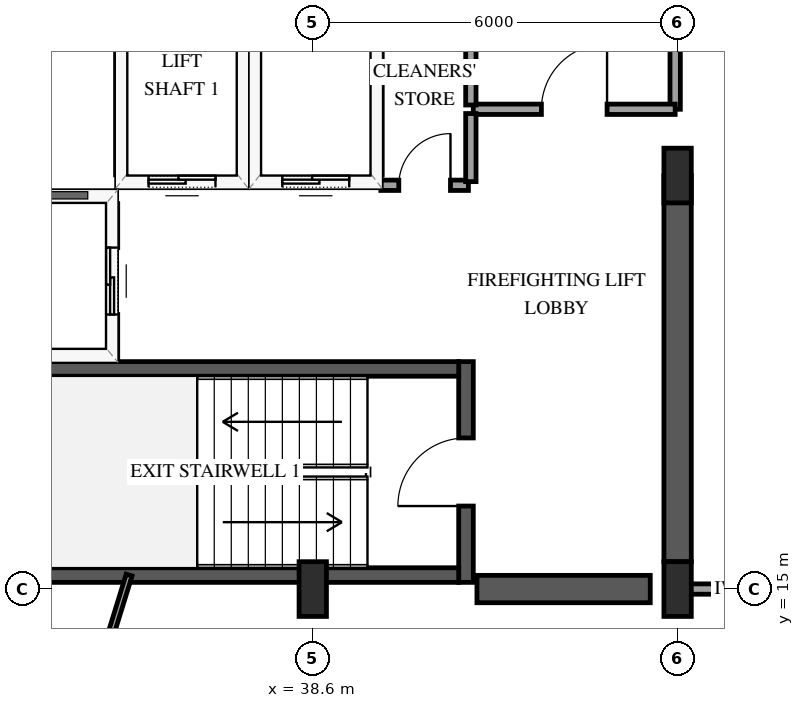
"""IFC4 building model, lengths in metres.
Left out: names, types, materials, properties, quantities, classifications, styles, units other than length and angle.
Written with IfcOpenShell. Run it as: python <this file> out.ifc"""

import sys

from ifc_helpers import new_model, si_unit, direction, frame, frame_2d, origin, origin_2d, place, context, subcontext, project, spatial, rectangle, extrude, element, fill, save


model = new_model("IFC4")
c1 = context("Model", 3, precision=1e-05, world=origin(), true_north=direction((0.0, 1.0)))
c2 = subcontext(c1, "Body", "Model", "MODEL_VIEW")
j1 = project(units=[si_unit("LENGTHUNIT", "METRE"), si_unit("PLANEANGLEUNIT", "RADIAN")], contexts=[c1])
p1 = place(None, origin())
s1 = spatial("IfcSite", under=j1, at=p1, CompositionType="ELEMENT")
p2 = place(p1, origin())
s2 = spatial("IfcBuilding", under=s1, at=p2, CompositionType="ELEMENT")
p3 = place(p2, frame((0.0, 0.0, 242.5)))
s3 = spatial("IfcBuildingStorey", under=s2, at=p3, CompositionType="ELEMENT", Elevation=242.5)
p4 = place(p3, frame((41.12, 15.11, 0.0), z_axis=(0.0, 0.0, 1.0), x_axis=(0.0, 1.0, 0.0)))
e1 = element("IfcWall", 1, at=p4, inside=s3, PredefinedType="SHEAR", context=c2, shape_type="SweptSolid", body=[
    extrude(rectangle(XDim=3.63, YDim=0.24, at=frame_2d((1.815, 0.0))), origin(), (0.0, 0.0, 1.0), 3.75),
])
p5 = place(p4, frame((1.255, 0.0, 0.0)))
e2 = element("IfcOpeningElement", 2, at=p5, cuts=e1, PredefinedType="OPENING", context=c2, shape_type="SweptSolid", body=[
    extrude(rectangle(XDim=1.12, YDim=2.15, at=frame_2d((0.56, 1.075))), frame((0.0, 0.13, 0.0), z_axis=(0.0, -1.0, 0.0), x_axis=(1.0, 0.0, 0.0)), (0.0, 0.0, 1.0), 0.26),
])
for number, where, z_axis, x_axis in (
    (3, (33.0, 15.23, 0.0), (0.0, 0.0, 1.0), (1.0, 0.0, 0.0)),
    (4, (33.0, 18.62, 0.0), (0.0, 0.0, 1.0), (1.0, 0.0, 0.0)),
):
    element("IfcWall", number, at=place(p3, frame(where, z_axis=z_axis, x_axis=x_axis)), inside=s3, PredefinedType="SHEAR", context=c2, shape_type="SweptSolid", body=[
        extrude(rectangle(XDim=8.0, YDim=0.24, at=frame_2d((4.0, 0.0))), origin(), (0.0, 0.0, 1.0), 3.75),
    ])
p6 = place(p3, frame((41.3, 15.0, 0.0), z_axis=(0.0, 0.0, 1.0), x_axis=(1.0, 0.0, 0.0)))
e5 = element("IfcWall", 5, at=p6, inside=s3, PredefinedType="SHEAR", context=c2, shape_type="SweptSolid", body=[
    extrude(rectangle(XDim=2.85, YDim=0.45, at=frame_2d((1.425, 0.0))), origin(), (0.0, 0.0, 1.0), 3.75),
])
p7 = place(p3, frame((44.6, 15.45, 0.0), z_axis=(0.0, 0.0, 1.0), x_axis=(0.0, 1.0, 0.0)))
e6 = element("IfcWall", 6, at=p7, inside=s3, PredefinedType="SHEAR", context=c2, shape_type="SweptSolid", body=[
    extrude(rectangle(XDim=6.35, YDim=0.45, at=frame_2d((3.175, 0.0))), origin(), (0.0, 0.0, 1.0), 3.75),
])
for number, where, z_axis, x_axis in (
    (7, (38.6, 15.0, -0.3), (0.0, 0.0, 1.0), (1.0, 0.0, 0.0)),
    (8, (44.6, 15.0, -0.3), (0.0, 0.0, 1.0), (1.0, 0.0, 0.0)),
    (9, (44.6, 21.8, -0.3), (0.0, 0.0, 1.0), (1.0, 0.0, 0.0)),
):
    element("IfcColumn", number, at=place(p3, frame(where, z_axis=z_axis, x_axis=x_axis)), inside=s3, PredefinedType="PILASTER", context=c2, shape_type="SweptSolid", body=[
        extrude(rectangle(XDim=0.45, YDim=0.9, at=origin_2d()), origin(), (0.0, 0.0, 1.0), 4.05),
    ])
p8 = place(p3, frame((35.45, 21.7, 0.0), z_axis=(0.0, 0.0, 1.0), x_axis=(1.0, 0.0, 0.0)))
e10 = element("IfcWall", 10, at=p8, inside=s3, PredefinedType="SOLIDWALL", context=c2, shape_type="SweptSolid", body=[
    extrude(rectangle(XDim=2.0, YDim=0.185, at=frame_2d((1.0, 0.0))), origin(), (0.0, 0.0, 1.0), 3.45),
])
p9 = place(p8, frame((0.45, 0.0, 0.0)))
e11 = element("IfcOpeningElement", 11, at=p9, cuts=e10, PredefinedType="OPENING", context=c2, shape_type="SweptSolid", body=[
    extrude(rectangle(XDim=1.1, YDim=2.15, at=frame_2d((0.55, 1.075))), frame((0.0, 0.103, 0.0), z_axis=(0.0, -1.0, 0.0), x_axis=(1.0, 0.0, 0.0)), (0.0, 0.0, 1.0), 0.205),
])
for number, where, z_axis, x_axis in (
    (12, (35.45, 21.81, 0.0), (0.0, 0.0, 1.0), (0.0, 1.0, 0.0)),
    (13, (37.45, 21.81, 0.0), (0.0, 0.0, 1.0), (0.0, 1.0, 0.0)),
):
    element("IfcWall", number, at=place(p3, frame(where, z_axis=z_axis, x_axis=x_axis)), inside=s3, PredefinedType="SOLIDWALL", context=c2, shape_type="SweptSolid", body=[
        extrude(rectangle(XDim=2.38, YDim=0.185, at=frame_2d((1.19, 0.0))), origin(), (0.0, 0.0, 1.0), 3.45),
    ])
p10 = place(p3, frame((37.65, 21.7, 0.0), z_axis=(0.0, 0.0, 1.0), x_axis=(1.0, 0.0, 0.0)))
e14 = element("IfcWall", 14, at=p10, inside=s3, PredefinedType="SOLIDWALL", context=c2, shape_type="SweptSolid", body=[
    extrude(rectangle(XDim=2.0, YDim=0.185, at=frame_2d((1.0, 0.0))), origin(), (0.0, 0.0, 1.0), 3.45),
])
p11 = place(p10, frame((0.45, 0.0, 0.0)))
e15 = element("IfcOpeningElement", 15, at=p11, cuts=e14, PredefinedType="OPENING", context=c2, shape_type="SweptSolid", body=[
    extrude(rectangle(XDim=1.1, YDim=2.15, at=frame_2d((0.55, 1.075))), frame((0.0, 0.103, 0.0), z_axis=(0.0, -1.0, 0.0), x_axis=(1.0, 0.0, 0.0)), (0.0, 0.0, 1.0), 0.205),
])
p12 = place(p3, frame((39.65, 21.81, 0.0), z_axis=(0.0, 0.0, 1.0), x_axis=(0.0, 1.0, 0.0)))
e16 = element("IfcWall", 16, at=p12, inside=s3, PredefinedType="SOLIDWALL", context=c2, shape_type="SweptSolid", body=[
    extrude(rectangle(XDim=2.38, YDim=0.185, at=frame_2d((1.19, 0.0))), origin(), (0.0, 0.0, 1.0), 3.45),
])
p13 = place(p3, frame((32.72, 21.45, 0.0), z_axis=(0.0, 0.0, 1.0), x_axis=(1.0, 0.0, 0.0)))
e17 = element("IfcWall", 17, at=p13, inside=s3, PredefinedType="SOLIDWALL", context=c2, shape_type="SweptSolid", body=[
    extrude(rectangle(XDim=2.58, YDim=0.185, at=frame_2d((1.29, 0.0))), origin(), (0.0, 0.0, 1.0), 3.45),
])
p14 = place(p3, frame((35.3, 18.79, 0.0), z_axis=(0.0, 0.0, 1.0), x_axis=(0.0, 1.0, 0.0)))
e18 = element("IfcWall", 18, at=p14, inside=s3, PredefinedType="SOLIDWALL", context=c2, shape_type="SweptSolid", body=[
    extrude(rectangle(XDim=2.55, YDim=0.185, at=frame_2d((1.275, 0.0))), origin(), (0.0, 0.0, 1.0), 3.45),
])
p15 = place(p14, frame((0.725, 0.0, 0.0)))
e19 = element("IfcOpeningElement", 19, at=p15, cuts=e18, PredefinedType="OPENING", context=c2, shape_type="SweptSolid", body=[
    extrude(rectangle(XDim=1.1, YDim=2.15, at=frame_2d((0.55, 1.075))), frame((0.0, 0.103, 0.0), z_axis=(0.0, -1.0, 0.0), x_axis=(1.0, 0.0, 0.0)), (0.0, 0.0, 1.0), 0.205),
])
p16 = place(p3, frame((44.56, 29.8, 0.0), z_axis=(0.0, 0.0, 1.0), x_axis=(0.0, -1.0, 0.0)))
e20 = element("IfcWall", 20, at=p16, inside=s3, PredefinedType="PARTITIONING", context=c2, shape_type="SweptSolid", body=[
    extrude(rectangle(XDim=6.91, YDim=0.17, at=frame_2d((3.455, 0.0))), origin(), (0.0, 0.0, 1.0), 2.49),
])
p17 = place(p16, frame((2.915, 0.0, 0.0)))
e21 = element("IfcOpeningElement", 21, at=p17, cuts=e20, PredefinedType="OPENING", context=c2, shape_type="SweptSolid", body=[
    extrude(rectangle(XDim=1.08, YDim=2.15, at=frame_2d((0.54, 1.075))), frame((0.0, 0.095, 0.0), z_axis=(0.0, -1.0, 0.0), x_axis=(1.0, 0.0, 0.0)), (0.0, 0.0, 1.0), 0.19),
])
p18 = place(p3, frame((35.58, 15.23, 0.0), z_axis=(0.0, 0.0, 1.0), x_axis=(-0.295332551785, -0.955394517389, 0.0)))
e22 = element("IfcWall", 22, at=p18, inside=s3, PredefinedType="PARTITIONING", context=c2, shape_type="SweptSolid", body=[
    extrude(rectangle(XDim=5.242, YDim=0.1, at=frame_2d((2.621, 0.0))), origin(), (0.0, 0.0, 1.0), 2.745),
])
p19 = place(p3, frame((41.24, 22.89, 0.0), z_axis=(0.0, 0.0, 1.0), x_axis=(1.0, 0.0, 0.0)))
e23 = element("IfcWall", 23, at=p19, inside=s3, PredefinedType="PARTITIONING", context=c2, shape_type="SweptSolid", body=[
    extrude(rectangle(XDim=3.32, YDim=0.17, at=frame_2d((1.66, 0.0))), origin(), (0.0, 0.0, 1.0), 3.45),
])
p20 = place(p19, frame((1.12, 0.0, 0.0)))
e24 = element("IfcOpeningElement", 24, at=p20, cuts=e23, PredefinedType="OPENING", context=c2, shape_type="SweptSolid", body=[
    extrude(rectangle(XDim=1.08, YDim=2.15, at=frame_2d((0.54, 1.075))), frame((0.0, 0.095, 0.0), z_axis=(0.0, -1.0, 0.0), x_axis=(1.0, 0.0, 0.0)), (0.0, 0.0, 1.0), 0.19),
])
p21 = place(p3, frame((41.2, 22.96, 0.0), z_axis=(0.0, 0.0, 1.0), x_axis=(0.0, 1.0, 0.0)))
e25 = element("IfcWall", 25, at=p21, inside=s3, PredefinedType="PARTITIONING", context=c2, shape_type="SweptSolid", body=[
    extrude(rectangle(XDim=1.46, YDim=0.17, at=frame_2d((0.73, 0.0))), origin(), (0.0, 0.0, 1.0), 3.45),
])
p22 = place(p3, frame((39.72, 21.64, 0.0), z_axis=(0.0, 0.0, 1.0), x_axis=(1.0, 0.0, 0.0)))
e26 = element("IfcWall", 26, at=p22, inside=s3, PredefinedType="PARTITIONING", context=c2, shape_type="SweptSolid", body=[
    extrude(rectangle(XDim=1.44, YDim=0.17, at=frame_2d((0.72, 0.0))), origin(), (0.0, 0.0, 1.0), 3.45),
])
p23 = place(p22, frame((0.295, 0.0, 0.0)))
e27 = element("IfcOpeningElement", 27, at=p23, cuts=e26, PredefinedType="OPENING", context=c2, shape_type="SweptSolid", body=[
    extrude(rectangle(XDim=0.85, YDim=2.1, at=frame_2d((0.425, 1.05))), frame((0.0, 0.095, 0.0), z_axis=(0.0, -1.0, 0.0), x_axis=(1.0, 0.0, 0.0)), (0.0, 0.0, 1.0), 0.19),
])
p24 = place(p3, frame((41.2, 21.7, 0.0), z_axis=(0.0, 0.0, 1.0), x_axis=(0.0, 1.0, 0.0)))
e28 = element("IfcWall", 28, at=p24, inside=s3, PredefinedType="PARTITIONING", context=c2, shape_type="SweptSolid", body=[
    extrude(rectangle(XDim=1.12, YDim=0.17, at=frame_2d((0.56, 0.0))), origin(), (0.0, 0.0, 1.0), 3.45),
])
p25 = place(p3, frame((45.439, 15.0, 0.0), z_axis=(0.0, 0.0, 1.0), x_axis=(-1.0, 0.0, 0.0)))
e29 = element("IfcWall", 29, at=p25, inside=s3, PredefinedType="PARTITIONING", context=c2, shape_type="SweptSolid", body=[
    extrude(rectangle(XDim=0.769, YDim=0.17, at=frame_2d((0.385, 0.0))), origin(), (0.0, 0.0, 1.0), 3.45),
])
p26 = place(p9, origin())
e30 = element("IfcDoor", 30, at=p26, inside=s3, OperationType="SLIDING_TO_LEFT", PredefinedType="DOOR", context=c2, shape_type="SweptSolid", body=[
    extrude(rectangle(XDim=1.1, YDim=2.15, at=frame_2d((0.55, 1.075))), frame((0.0, 0.025, 0.0), z_axis=(0.0, -1.0, 0.0), x_axis=(1.0, 0.0, 0.0)), (0.0, 0.0, 1.0), 0.05),
])
fill(e11, e30)
p27 = place(p11, origin())
e31 = element("IfcDoor", 31, at=p27, inside=s3, OperationType="SLIDING_TO_LEFT", PredefinedType="DOOR", context=c2, shape_type="SweptSolid", body=[
    extrude(rectangle(XDim=1.1, YDim=2.15, at=frame_2d((0.55, 1.075))), frame((0.0, 0.025, 0.0), z_axis=(0.0, -1.0, 0.0), x_axis=(1.0, 0.0, 0.0)), (0.0, 0.0, 1.0), 0.05),
])
fill(e15, e31)
p28 = place(p15, origin())
e32 = element("IfcDoor", 32, at=p28, inside=s3, OperationType="SLIDING_TO_LEFT", PredefinedType="DOOR", context=c2, shape_type="SweptSolid", body=[
    extrude(rectangle(XDim=1.1, YDim=2.15, at=frame_2d((0.55, 1.075))), frame((0.0, 0.025, 0.0), z_axis=(0.0, -1.0, 0.0), x_axis=(1.0, 0.0, 0.0)), (0.0, 0.0, 1.0), 0.05),
])
fill(e19, e32)
p29 = place(p5, origin())
e33 = element("IfcDoor", 33, at=p29, inside=s3, OperationType="SINGLE_SWING_LEFT", PredefinedType="DOOR", context=c2, shape_type="SweptSolid", body=[
    extrude(rectangle(XDim=1.12, YDim=2.15, at=frame_2d((0.56, 1.075))), frame((0.0, 0.025, 0.0), z_axis=(0.0, -1.0, 0.0), x_axis=(1.0, 0.0, 0.0)), (0.0, 0.0, 1.0), 0.05),
])
fill(e2, e33)
p30 = place(p20, origin())
e34 = element("IfcDoor", 34, at=p30, inside=s3, OperationType="SINGLE_SWING_RIGHT", PredefinedType="DOOR", context=c2, shape_type="SweptSolid", body=[
    extrude(rectangle(XDim=1.08, YDim=2.15, at=frame_2d((0.54, 1.075))), frame((0.0, 0.025, 0.0), z_axis=(0.0, -1.0, 0.0), x_axis=(1.0, 0.0, 0.0)), (0.0, 0.0, 1.0), 0.05),
])
fill(e24, e34)
p31 = place(p23, origin())
e35 = element("IfcDoor", 35, at=p31, inside=s3, OperationType="SINGLE_SWING_RIGHT", PredefinedType="DOOR", context=c2, shape_type="SweptSolid", body=[
    extrude(rectangle(XDim=0.85, YDim=2.1, at=frame_2d((0.425, 1.05))), frame((0.0, 0.025, 0.0), z_axis=(0.0, -1.0, 0.0), x_axis=(1.0, 0.0, 0.0)), (0.0, 0.0, 1.0), 0.05),
])
fill(e27, e35)
save(model, sys.argv[1])
